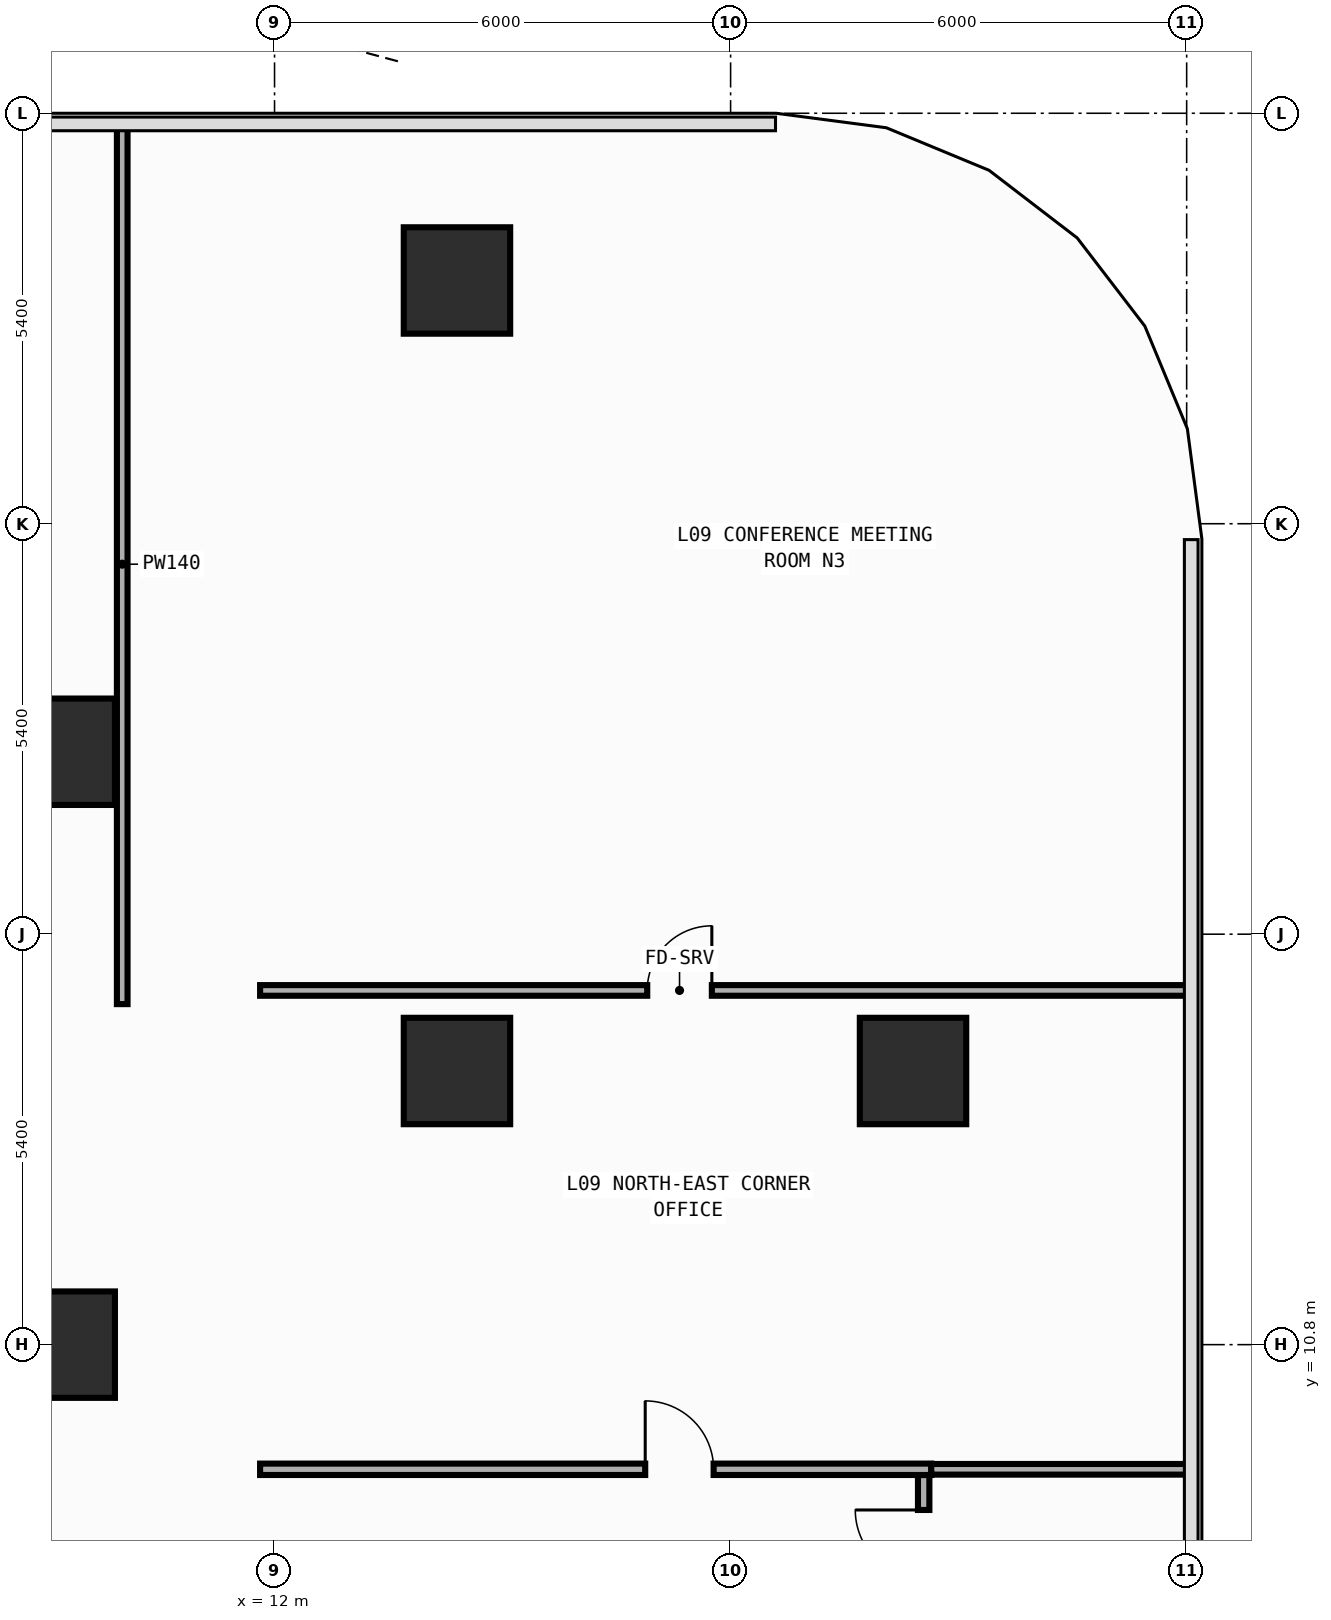
"""IFC4 building model, lengths in metres.
Left out: names, types, materials, properties, quantities, classifications, styles, units other than length and angle.
Written with IfcOpenShell. Run it as: python <this file> out.ifc"""

import sys

from ifc_helpers import new_model, si_unit, direction, frame, frame_2d, origin, origin_2d, place, context, subcontext, project, spatial, rectangle, extrude, element, fill, save


model = new_model("IFC4")
c1 = context("Model", 3, precision=1e-05, world=origin(), true_north=direction((0.0, 1.0)))
c2 = subcontext(c1, "Body", "Model", "MODEL_VIEW")
j1 = project(units=[si_unit("LENGTHUNIT", "METRE"), si_unit("PLANEANGLEUNIT", "RADIAN")], contexts=[c1])
p1 = place(None, origin())
s1 = spatial("IfcSite", under=j1, at=p1, CompositionType="ELEMENT")
p2 = place(p1, origin())
s2 = spatial("IfcBuilding", under=s1, at=p2, CompositionType="ELEMENT")
p3 = place(p2, frame((0.0, 0.0, 38.6)))
s3 = spatial("IfcBuildingStorey", under=s2, at=p3, CompositionType="ELEMENT", Elevation=38.6)
for number, where, z_axis, x_axis in (
    (1, (9.2, 10.8, 0.0), (0.0, 0.0, 1.0), (1.0, 0.0, 0.0)),
    (2, (9.2, 18.6, 0.0), (0.0, 0.0, 1.0), (1.0, 0.0, 0.0)),
    (3, (20.4, 14.4, 0.0), (0.0, 0.0, 1.0), (1.0, 0.0, 0.0)),
    (4, (14.4, 14.4, 0.0), (0.0, 0.0, 1.0), (1.0, 0.0, 0.0)),
    (5, (14.4, 24.8, 0.0), (0.0, 0.0, 1.0), (1.0, 0.0, 0.0)),
):
    element("IfcColumn", number, at=place(p3, frame(where, z_axis=z_axis, x_axis=x_axis)), inside=s3, PredefinedType="COLUMN", context=c2, shape_type="SweptSolid", body=[
        extrude(rectangle(XDim=1.4, YDim=1.4, at=origin_2d()), origin(), (0.0, 0.0, 1.0), 4.2),
    ])
p4 = place(p3, frame((20.54, 7.06, 0.0), z_axis=(0.0, 0.0, 1.0), x_axis=(0.0, 1.0, 0.0)))
e6 = element("IfcWall", 6, at=p4, inside=s3, PredefinedType="PARTITIONING", context=c2, shape_type="SweptSolid", body=[
    extrude(rectangle(XDim=2.025, YDim=0.15, at=frame_2d((1.012, 0.0))), origin(), (0.0, 0.0, 1.0), 3.94),
])
p5 = place(p4, frame((0.665, 0.0, 0.0)))
e7 = element("IfcOpeningElement", 7, at=p5, cuts=e6, PredefinedType="OPENING", context=c2, shape_type="SweptSolid", body=[
    extrude(rectangle(XDim=0.9, YDim=2.15, at=frame_2d((0.45, 1.075))), frame((0.0, 0.085, 0.0), z_axis=(0.0, -1.0, 0.0), x_axis=(1.0, 0.0, 0.0)), (0.0, 0.0, 1.0), 0.17),
])
p6 = place(p3, frame((11.81, 9.16, 0.0), z_axis=(0.0, 0.0, 1.0), x_axis=(1.0, 0.0, 0.0)))
e8 = element("IfcWall", 8, at=p6, inside=s3, PredefinedType="PARTITIONING", context=c2, shape_type="SweptSolid", body=[
    extrude(rectangle(XDim=8.83, YDim=0.15, at=frame_2d((4.415, 0.0))), origin(), (0.0, 0.0, 1.0), 3.94),
])
p7 = place(p6, frame((5.067, 0.0, 0.0)))
e9 = element("IfcOpeningElement", 9, at=p7, cuts=e8, PredefinedType="OPENING", context=c2, shape_type="SweptSolid", body=[
    extrude(rectangle(XDim=0.9, YDim=2.15, at=frame_2d((0.45, 1.075))), frame((0.0, 0.085, 0.0), z_axis=(0.0, -1.0, 0.0), x_axis=(1.0, 0.0, 0.0)), (0.0, 0.0, 1.0), 0.17),
])
p8 = place(p3, frame((20.64, 9.16, 0.0), z_axis=(0.0, 0.0, 1.0), x_axis=(1.0, 0.0, 0.0)))
e10 = element("IfcWall", 10, at=p8, inside=s3, PredefinedType="PARTITIONING", context=c2, shape_type="SweptSolid", body=[
    extrude(rectangle(XDim=3.415, YDim=0.14, at=frame_2d((1.708, 0.0))), origin(), (0.0, 0.0, 1.0), 3.94),
])
p9 = place(p3, frame((11.81, 15.46, 0.0), z_axis=(0.0, 0.0, 1.0), x_axis=(1.0, 0.0, 0.0)))
e11 = element("IfcWall", 11, at=p9, inside=s3, PredefinedType="PARTITIONING", context=c2, shape_type="SweptSolid", body=[
    extrude(rectangle(XDim=12.245, YDim=0.14, at=frame_2d((6.123, 0.0))), origin(), (0.0, 0.0, 1.0), 3.94),
])
p10 = place(p9, frame((5.093, 0.0, 0.0)))
e12 = element("IfcOpeningElement", 12, at=p10, cuts=e11, PredefinedType="OPENING", context=c2, shape_type="SweptSolid", body=[
    extrude(rectangle(XDim=0.85, YDim=2.1, at=frame_2d((0.425, 1.05))), frame((0.0, 0.08, 0.0), z_axis=(0.0, -1.0, 0.0), x_axis=(1.0, 0.0, 0.0)), (0.0, 0.0, 1.0), 0.16),
])
p11 = place(p3, frame((9.996, 15.28, 0.0), z_axis=(0.0, 0.0, 1.0), x_axis=(0.0, 1.0, 0.0)))
e13 = element("IfcWall", 13, at=p11, inside=s3, PredefinedType="PARTITIONING", context=c2, shape_type="SweptSolid", body=[
    extrude(rectangle(XDim=11.575, YDim=0.14, at=frame_2d((5.788, 0.0))), origin(), (0.0, 0.0, 1.0), 3.94),
])
p12 = place(p5, origin())
e14 = element("IfcDoor", 14, at=p12, inside=s3, OperationType="SINGLE_SWING_RIGHT", PredefinedType="DOOR", context=c2, shape_type="SweptSolid", body=[
    extrude(rectangle(XDim=0.9, YDim=2.15, at=frame_2d((0.45, 1.075))), frame((0.0, 0.025, 0.0), z_axis=(0.0, -1.0, 0.0), x_axis=(1.0, 0.0, 0.0)), (0.0, 0.0, 1.0), 0.05),
])
fill(e7, e14)
p13 = place(p7, origin())
e15 = element("IfcDoor", 15, at=p13, inside=s3, OperationType="SINGLE_SWING_LEFT", PredefinedType="DOOR", context=c2, shape_type="SweptSolid", body=[
    extrude(rectangle(XDim=0.9, YDim=2.15, at=frame_2d((0.45, 1.075))), frame((0.0, 0.025, 0.0), z_axis=(0.0, -1.0, 0.0), x_axis=(1.0, 0.0, 0.0)), (0.0, 0.0, 1.0), 0.05),
])
fill(e9, e15)
p14 = place(p10, origin())
e16 = element("IfcDoor", 16, at=p14, inside=s3, OperationType="SINGLE_SWING_RIGHT", PredefinedType="DOOR", context=c2, shape_type="SweptSolid", body=[
    extrude(rectangle(XDim=0.85, YDim=2.1, at=frame_2d((0.425, 1.05))), frame((0.0, 0.025, 0.0), z_axis=(0.0, -1.0, 0.0), x_axis=(1.0, 0.0, 0.0)), (0.0, 0.0, 1.0), 0.05),
])
fill(e12, e16)
save(model, sys.argv[1])
